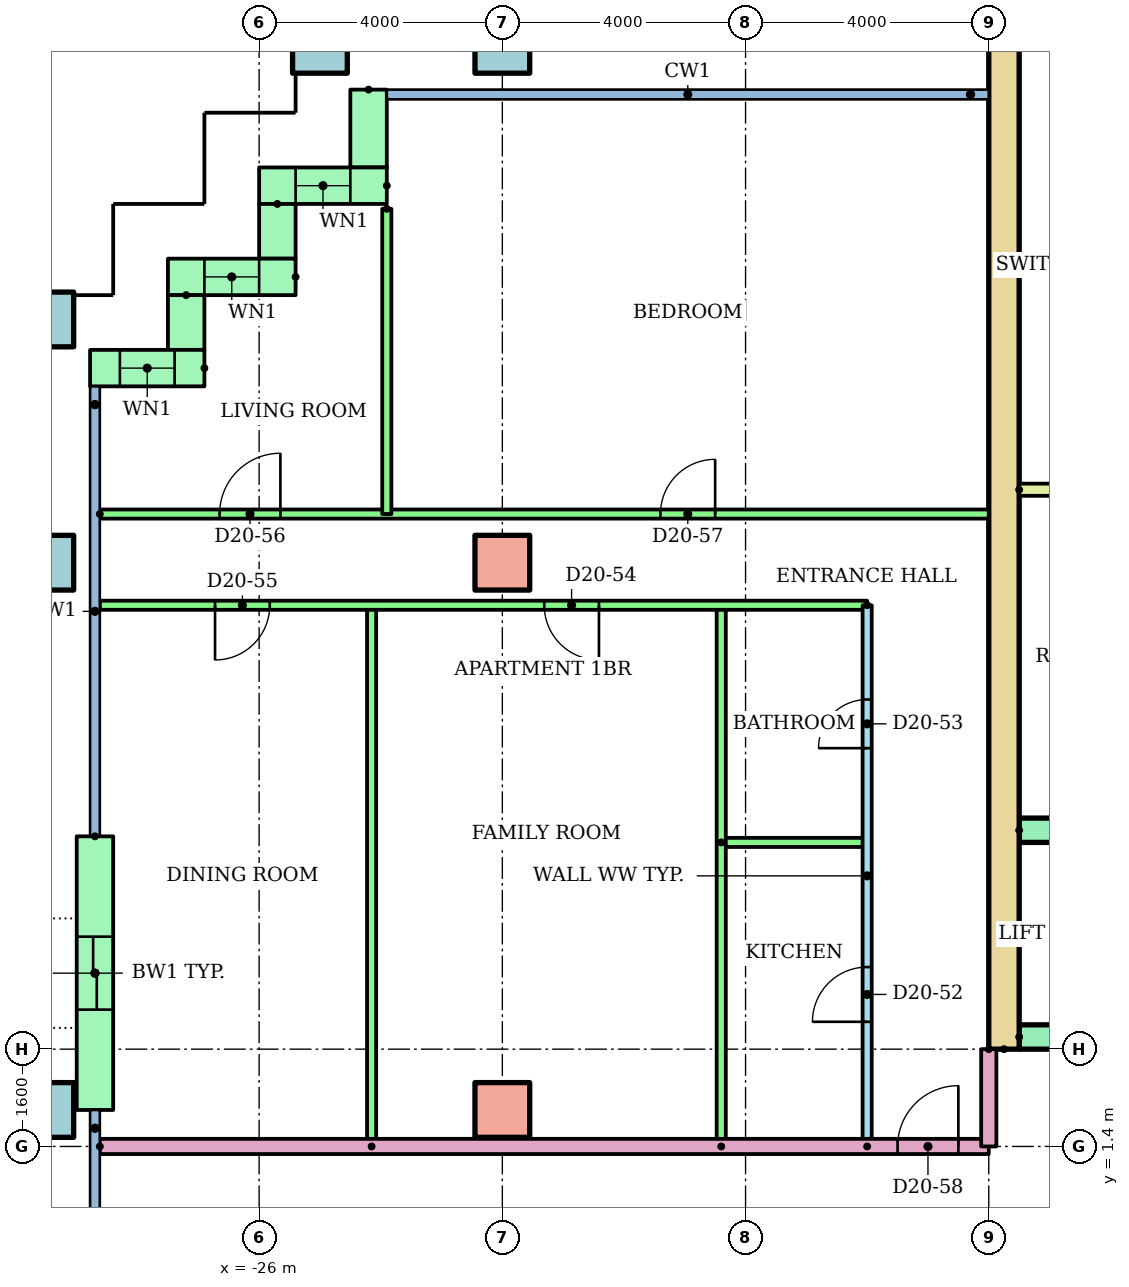
"""IFC4 building model, lengths in metres.
Left out: names, types, materials, properties, quantities, classifications, styles, units other than length and angle.
Written with IfcOpenShell. Run it as: python <this file> out.ifc"""

import sys

from ifc_helpers import new_model, si_unit, direction, frame, frame_2d, origin, origin_2d, place, context, subcontext, project, spatial, rectangle, hollow_rectangle, extrude, element, fill, save


model = new_model("IFC4")
c1 = context("Model", 3, precision=1e-05, world=origin(), true_north=direction((0.0, 1.0)))
c2 = subcontext(c1, "Body", "Model", "MODEL_VIEW")
j1 = project(units=[si_unit("LENGTHUNIT", "METRE"), si_unit("PLANEANGLEUNIT", "RADIAN")], contexts=[c1])
p1 = place(None, origin())
s1 = spatial("IfcSite", under=j1, at=p1, CompositionType="ELEMENT")
p2 = place(p1, origin())
s2 = spatial("IfcBuilding", under=s1, at=p2, CompositionType="ELEMENT")
p3 = place(p2, frame((0.0, 0.0, 80.7)))
s3 = spatial("IfcBuildingStorey", under=s2, at=p3, CompositionType="ELEMENT", Elevation=80.7)
p4 = place(p3, frame((-29.5, 2.0, 0.0)))
e1 = element("IfcColumn", 1, at=p4, inside=s3, PredefinedType="COLUMN", context=c2, shape_type="SweptSolid", body=[
    extrude(hollow_rectangle(XDim=0.9, YDim=0.9, WallThickness=0.045, at=origin_2d()), origin(), (0.0, 0.0, 1.0), 3.2),
])
p5 = place(p3, frame((-22.0, 2.0, 0.0)))
e2 = element("IfcColumn", 2, at=p5, inside=s3, PredefinedType="COLUMN", context=c2, shape_type="SweptSolid", body=[
    extrude(rectangle(XDim=0.9, YDim=0.9, at=origin_2d()), origin(), (0.0, 0.0, 1.0), 3.2),
])
p6 = place(p3, frame((-29.5, 11.0, 0.0)))
e3 = element("IfcColumn", 3, at=p6, inside=s3, PredefinedType="COLUMN", context=c2, shape_type="SweptSolid", body=[
    extrude(hollow_rectangle(XDim=0.9, YDim=0.9, WallThickness=0.045, at=origin_2d()), origin(), (0.0, 0.0, 1.0), 3.2),
])
p7 = place(p3, frame((-22.0, 11.0, 0.0)))
e4 = element("IfcColumn", 4, at=p7, inside=s3, PredefinedType="COLUMN", context=c2, shape_type="SweptSolid", body=[
    extrude(rectangle(XDim=0.9, YDim=0.9, at=origin_2d()), origin(), (0.0, 0.0, 1.0), 3.2),
])
for number, where in (
    (5, (-29.5, 15.0, 0.0)),
    (6, (-25.0, 19.5, 0.0)),
    (7, (-22.0, 19.5, 0.0)),
):
    element("IfcColumn", number, at=place(p3, frame(where)), inside=s3, PredefinedType="COLUMN", context=c2, shape_type="SweptSolid", body=[
        extrude(hollow_rectangle(XDim=0.9, YDim=0.9, WallThickness=0.045, at=origin_2d()), origin(), (0.0, 0.0, 1.0), 3.2),
    ])
p8 = place(p3, frame((-24.2, 18.78, 0.0), z_axis=(0.0, 0.0, 1.0), x_axis=(0.0, -1.0, 0.0)))
e8 = element("IfcWall", 8, at=p8, inside=s3, PredefinedType="STANDARD", context=c2, shape_type="SweptSolid", body=[
    extrude(rectangle(XDim=1.28, YDim=0.6, at=frame_2d((0.64, 0.0))), origin(), (0.0, 0.0, 1.0), 2.92),
])
p9 = place(p3, frame((-23.9, 17.2, 0.0), z_axis=(0.0, 0.0, 1.0), x_axis=(-1.0, 0.0, 0.0)))
e9 = element("IfcWall", 9, at=p9, inside=s3, PredefinedType="STANDARD", context=c2, shape_type="SweptSolid", body=[
    extrude(rectangle(XDim=2.1, YDim=0.6, at=frame_2d((1.05, 0.0))), origin(), (0.0, 0.0, 1.0), 2.92),
])
p10 = place(p9, frame((0.6, 0.0, 0.9)))
e10 = element("IfcOpeningElement", 10, at=p10, cuts=e9, PredefinedType="OPENING", context=c2, shape_type="SweptSolid", body=[
    extrude(rectangle(XDim=0.9, YDim=1.5, at=frame_2d((0.45, 0.75))), frame((0.0, 0.31, 0.0), z_axis=(0.0, -1.0, 0.0), x_axis=(1.0, 0.0, 0.0)), (0.0, 0.0, 1.0), 0.62),
])
p11 = place(p3, frame((-25.7, 16.9, 0.0), z_axis=(0.0, 0.0, 1.0), x_axis=(0.0, -1.0, 0.0)))
e11 = element("IfcWall", 11, at=p11, inside=s3, PredefinedType="STANDARD", context=c2, shape_type="SweptSolid", body=[
    extrude(rectangle(XDim=0.9, YDim=0.6, at=frame_2d((0.45, 0.0))), origin(), (0.0, 0.0, 1.0), 2.92),
])
p12 = place(p3, frame((-25.4, 15.7, 0.0), z_axis=(0.0, 0.0, 1.0), x_axis=(-1.0, 0.0, 0.0)))
e12 = element("IfcWall", 12, at=p12, inside=s3, PredefinedType="STANDARD", context=c2, shape_type="SweptSolid", body=[
    extrude(rectangle(XDim=2.1, YDim=0.6, at=frame_2d((1.05, 0.0))), origin(), (0.0, 0.0, 1.0), 2.92),
])
p13 = place(p12, frame((0.6, 0.0, 0.9)))
e13 = element("IfcOpeningElement", 13, at=p13, cuts=e12, PredefinedType="OPENING", context=c2, shape_type="SweptSolid", body=[
    extrude(rectangle(XDim=0.9, YDim=1.5, at=frame_2d((0.45, 0.75))), frame((0.0, 0.31, 0.0), z_axis=(0.0, -1.0, 0.0), x_axis=(1.0, 0.0, 0.0)), (0.0, 0.0, 1.0), 0.62),
])
p14 = place(p3, frame((-27.2, 15.4, 0.0), z_axis=(0.0, 0.0, 1.0), x_axis=(0.0, -1.0, 0.0)))
e14 = element("IfcWall", 14, at=p14, inside=s3, PredefinedType="STANDARD", context=c2, shape_type="SweptSolid", body=[
    extrude(rectangle(XDim=0.9, YDim=0.6, at=frame_2d((0.45, 0.0))), origin(), (0.0, 0.0, 1.0), 2.92),
])
p15 = place(p3, frame((-26.9, 14.2, 0.0), z_axis=(0.0, 0.0, 1.0), x_axis=(-1.0, 0.0, 0.0)))
e15 = element("IfcWall", 15, at=p15, inside=s3, PredefinedType="STANDARD", context=c2, shape_type="SweptSolid", body=[
    extrude(rectangle(XDim=1.88, YDim=0.6, at=frame_2d((0.94, 0.0))), origin(), (0.0, 0.0, 1.0), 2.92),
])
p16 = place(p15, frame((0.49, 0.0, 0.9)))
e16 = element("IfcOpeningElement", 16, at=p16, cuts=e15, PredefinedType="OPENING", context=c2, shape_type="SweptSolid", body=[
    extrude(rectangle(XDim=0.9, YDim=1.5, at=frame_2d((0.45, 0.75))), frame((0.0, 0.31, 0.0), z_axis=(0.0, -1.0, 0.0), x_axis=(1.0, 0.0, 0.0)), (0.0, 0.0, 1.0), 0.62),
])
p17 = place(p3, frame((-28.7, 6.5, 0.0), z_axis=(0.0, 0.0, 1.0), x_axis=(0.0, -1.0, 0.0)))
e17 = element("IfcWall", 17, at=p17, inside=s3, PredefinedType="STANDARD", context=c2, shape_type="SweptSolid", body=[
    extrude(rectangle(XDim=4.5, YDim=0.6, at=frame_2d((2.25, 0.0))), origin(), (0.0, 0.0, 1.0), 2.92),
])
p18 = place(p17, frame((1.65, 0.0, 0.0)))
e18 = element("IfcOpeningElement", 18, at=p18, cuts=e17, PredefinedType="OPENING", context=c2, shape_type="SweptSolid", body=[
    extrude(rectangle(XDim=1.2, YDim=2.1, at=frame_2d((0.6, 1.05))), frame((0.0, 0.31, 0.0), z_axis=(0.0, -1.0, 0.0), x_axis=(1.0, 0.0, 0.0)), (0.0, 0.0, 1.0), 0.62),
])
p19 = place(p3, frame((-13.75, 3.0, 0.0), z_axis=(0.0, 0.0, 1.0), x_axis=(0.0, 1.0, 0.0)))
e19 = element("IfcWall", 19, at=p19, inside=s3, PredefinedType="SHEAR", context=c2, shape_type="SweptSolid", body=[
    extrude(rectangle(XDim=17.0, YDim=0.5, at=frame_2d((8.5, 0.0))), origin(), (0.0, 0.0, 1.0), 2.92),
])
p20 = place(p3, frame((-13.5, 3.2, 0.0)))
e20 = element("IfcWall", 20, at=p20, inside=s3, PredefinedType="SHEAR", context=c2, shape_type="SweptSolid", body=[
    extrude(rectangle(XDim=27.0, YDim=0.4, at=frame_2d((13.5, 0.0))), origin(), (0.0, 0.0, 1.0), 2.92),
])
p21 = place(p20, frame((6.861, 0.0, 0.0)))
e21 = element("IfcOpeningElement", 21, at=p21, cuts=e20, PredefinedType="OPENING", context=c2, shape_type="SweptSolid", body=[
    extrude(rectangle(XDim=1.1, YDim=2.1, at=frame_2d((0.55, 1.05))), frame((0.0, 0.21, 0.0), z_axis=(0.0, -1.0, 0.0), x_axis=(1.0, 0.0, 0.0)), (0.0, 0.0, 1.0), 0.42),
])
p22 = place(p20, frame((9.906, 0.0, 0.0)))
e22 = element("IfcOpeningElement", 22, at=p22, cuts=e20, PredefinedType="OPENING", context=c2, shape_type="SweptSolid", body=[
    extrude(rectangle(XDim=1.1, YDim=2.1, at=frame_2d((0.55, 1.05))), frame((0.0, 0.21, 0.0), z_axis=(0.0, -1.0, 0.0), x_axis=(1.0, 0.0, 0.0)), (0.0, 0.0, 1.0), 0.42),
])
p23 = place(p20, frame((15.994, 0.0, 0.0)))
e23 = element("IfcOpeningElement", 23, at=p23, cuts=e20, PredefinedType="OPENING", context=c2, shape_type="SweptSolid", body=[
    extrude(rectangle(XDim=1.1, YDim=2.1, at=frame_2d((0.55, 1.05))), frame((0.0, 0.21, 0.0), z_axis=(0.0, -1.0, 0.0), x_axis=(1.0, 0.0, 0.0)), (0.0, 0.0, 1.0), 0.42),
])
p24 = place(p20, frame((19.039, 0.0, 0.0)))
e24 = element("IfcOpeningElement", 24, at=p24, cuts=e20, PredefinedType="OPENING", context=c2, shape_type="SweptSolid", body=[
    extrude(rectangle(XDim=1.1, YDim=2.1, at=frame_2d((0.55, 1.05))), frame((0.0, 0.21, 0.0), z_axis=(0.0, -1.0, 0.0), x_axis=(1.0, 0.0, 0.0)), (0.0, 0.0, 1.0), 0.42),
])
p25 = place(p20, frame((12.6, 0.0, 0.0)))
e25 = element("IfcOpeningElement", 25, at=p25, cuts=e20, PredefinedType="OPENING", context=c2, shape_type="SweptSolid", body=[
    extrude(rectangle(XDim=1.8, YDim=2.1, at=frame_2d((0.9, 1.05))), frame((0.0, 0.21, 0.0), z_axis=(0.0, -1.0, 0.0), x_axis=(1.0, 0.0, 0.0)), (0.0, 0.0, 1.0), 0.42),
])
p26 = place(p3, frame((-13.5, 6.6, 0.0)))
e26 = element("IfcWall", 26, at=p26, inside=s3, PredefinedType="SHEAR", context=c2, shape_type="SweptSolid", body=[
    extrude(rectangle(XDim=11.978, YDim=0.4, at=frame_2d((5.989, 0.0))), origin(), (0.0, 0.0, 1.0), 2.92),
])
p27 = place(p3, frame((-13.5, 12.2, 0.0)))
e27 = element("IfcWall", 27, at=p27, inside=s3, PredefinedType="PARTITIONING", context=c2, shape_type="SweptSolid", body=[
    extrude(rectangle(XDim=3.9, YDim=0.2, at=frame_2d((1.95, 0.0))), origin(), (0.0, 0.0, 1.0), 2.92),
])
p28 = place(p3, frame((-16.0, 1.4, 0.0), z_axis=(0.0, 0.0, 1.0), x_axis=(0.0, 1.0, 0.0)))
e28 = element("IfcWall", 28, at=p28, inside=s3, PredefinedType="PARTITIONING", context=c2, shape_type="SweptSolid", body=[
    extrude(rectangle(XDim=8.9, YDim=0.15, at=frame_2d((4.45, 0.0))), origin(), (0.0, 0.0, 1.0), 2.4),
])
p29 = place(p28, frame((2.05, 0.0, 0.0)))
e29 = element("IfcOpeningElement", 29, at=p29, cuts=e28, PredefinedType="OPENING", context=c2, shape_type="SweptSolid", body=[
    extrude(rectangle(XDim=0.9, YDim=2.1, at=frame_2d((0.45, 1.05))), frame((0.0, 0.085, 0.0), z_axis=(0.0, -1.0, 0.0), x_axis=(1.0, 0.0, 0.0)), (0.0, 0.0, 1.0), 0.17),
])
p30 = place(p28, frame((6.55, 0.0, 0.0)))
e30 = element("IfcOpeningElement", 30, at=p30, cuts=e28, PredefinedType="OPENING", context=c2, shape_type="SweptSolid", body=[
    extrude(rectangle(XDim=0.8, YDim=2.1, at=frame_2d((0.4, 1.05))), frame((0.0, 0.085, 0.0), z_axis=(0.0, -1.0, 0.0), x_axis=(1.0, 0.0, 0.0)), (0.0, 0.0, 1.0), 0.17),
])
p31 = place(p3, frame((-18.4, 6.4, 0.0)))
e31 = element("IfcWall", 31, at=p31, inside=s3, PredefinedType="PARTITIONING", context=c2, shape_type="SweptSolid", body=[
    extrude(rectangle(XDim=2.4, YDim=0.15, at=frame_2d((1.2, 0.0))), origin(), (0.0, 0.0, 1.0), 2.4),
])
for number, where, z_axis, x_axis in (
    (32, (-18.4, 1.4, 0.0), (0.0, 0.0, 1.0), (0.0, 1.0, 0.0)),
    (33, (-24.15, 1.4, 0.0), (0.0, 0.0, 1.0), (0.0, 1.0, 0.0)),
):
    element("IfcWall", number, at=place(p3, frame(where, z_axis=z_axis, x_axis=x_axis)), inside=s3, PredefinedType="PARTITIONING", context=c2, shape_type="SweptSolid", body=[
        extrude(rectangle(XDim=8.9, YDim=0.15, at=frame_2d((4.45, 0.0))), origin(), (0.0, 0.0, 1.0), 2.4),
    ])
p32 = place(p3, frame((-16.0, 10.3, 0.0), z_axis=(0.0, 0.0, 1.0), x_axis=(-1.0, 0.0, 0.0)))
e34 = element("IfcWall", 34, at=p32, inside=s3, PredefinedType="PARTITIONING", context=c2, shape_type="SweptSolid", body=[
    extrude(rectangle(XDim=12.62, YDim=0.15, at=frame_2d((6.31, 0.0))), origin(), (0.0, 0.0, 1.0), 2.4),
])
p33 = place(p32, frame((4.411, 0.0, 0.0)))
e35 = element("IfcOpeningElement", 35, at=p33, cuts=e34, PredefinedType="OPENING", context=c2, shape_type="SweptSolid", body=[
    extrude(rectangle(XDim=0.9, YDim=2.1, at=frame_2d((0.45, 1.05))), frame((0.0, 0.085, 0.0), z_axis=(0.0, -1.0, 0.0), x_axis=(1.0, 0.0, 0.0)), (0.0, 0.0, 1.0), 0.17),
])
p34 = place(p32, frame((9.825, 0.0, 0.0)))
e36 = element("IfcOpeningElement", 36, at=p34, cuts=e34, PredefinedType="OPENING", context=c2, shape_type="SweptSolid", body=[
    extrude(rectangle(XDim=0.9, YDim=2.1, at=frame_2d((0.45, 1.05))), frame((0.0, 0.085, 0.0), z_axis=(0.0, -1.0, 0.0), x_axis=(1.0, 0.0, 0.0)), (0.0, 0.0, 1.0), 0.17),
])
p35 = place(p3, frame((-28.62, 11.8, 0.0)))
e37 = element("IfcWall", 37, at=p35, inside=s3, PredefinedType="PARTITIONING", context=c2, shape_type="SweptSolid", body=[
    extrude(rectangle(XDim=14.62, YDim=0.15, at=frame_2d((7.31, 0.0))), origin(), (0.0, 0.0, 1.0), 2.4),
])
p36 = place(p35, frame((1.97, 0.0, 0.0)))
e38 = element("IfcOpeningElement", 38, at=p36, cuts=e37, PredefinedType="OPENING", context=c2, shape_type="SweptSolid", body=[
    extrude(rectangle(XDim=1.0, YDim=2.1, at=frame_2d((0.5, 1.05))), frame((0.0, 0.085, 0.0), z_axis=(0.0, -1.0, 0.0), x_axis=(1.0, 0.0, 0.0)), (0.0, 0.0, 1.0), 0.17),
])
p37 = place(p35, frame((9.22, 0.0, 0.0)))
e39 = element("IfcOpeningElement", 39, at=p37, cuts=e37, PredefinedType="OPENING", context=c2, shape_type="SweptSolid", body=[
    extrude(rectangle(XDim=0.9, YDim=2.1, at=frame_2d((0.45, 1.05))), frame((0.0, 0.085, 0.0), z_axis=(0.0, -1.0, 0.0), x_axis=(1.0, 0.0, 0.0)), (0.0, 0.0, 1.0), 0.17),
])
p38 = place(p3, frame((-23.9, 16.82, 0.0), z_axis=(0.0, 0.0, 1.0), x_axis=(0.0, -1.0, 0.0)))
e40 = element("IfcWall", 40, at=p38, inside=s3, PredefinedType="PARTITIONING", context=c2, shape_type="SweptSolid", body=[
    extrude(rectangle(XDim=5.02, YDim=0.15, at=frame_2d((2.51, 0.0))), origin(), (0.0, 0.0, 1.0), 2.4),
])
p39 = place(p3, frame((-28.62, 1.4, 0.0)))
e41 = element("IfcWall", 41, at=p39, inside=s3, PredefinedType="PARTITIONING", context=c2, shape_type="SweptSolid", body=[
    extrude(rectangle(XDim=14.62, YDim=0.25, at=frame_2d((7.31, 0.0))), origin(), (0.0, 0.0, 1.0), 2.4),
])
p40 = place(p39, frame((13.12, 0.0, 0.0)))
e42 = element("IfcOpeningElement", 42, at=p40, cuts=e41, PredefinedType="OPENING", context=c2, shape_type="SweptSolid", body=[
    extrude(rectangle(XDim=1.0, YDim=2.1, at=frame_2d((0.5, 1.05))), frame((0.0, 0.135, 0.0), z_axis=(0.0, -1.0, 0.0), x_axis=(1.0, 0.0, 0.0)), (0.0, 0.0, 1.0), 0.27),
])
p41 = place(p3, frame((-14.0, 3.0, 0.0), z_axis=(0.0, 0.0, 1.0), x_axis=(0.0, -1.0, 0.0)))
e43 = element("IfcWall", 43, at=p41, inside=s3, PredefinedType="PARTITIONING", context=c2, shape_type="SweptSolid", body=[
    extrude(rectangle(XDim=1.6, YDim=0.25, at=frame_2d((0.8, 0.0))), origin(), (0.0, 0.0, 1.0), 2.4),
])
p42 = place(p10, origin())
e44 = element("IfcWindow", 44, at=p42, inside=s3, PartitioningType="SINGLE_PANEL", PredefinedType="WINDOW", context=c2, shape_type="SweptSolid", body=[
    extrude(rectangle(XDim=0.9, YDim=1.5, at=frame_2d((0.45, 0.75))), frame((0.0, 0.03, 0.0), z_axis=(0.0, -1.0, 0.0), x_axis=(1.0, 0.0, 0.0)), (0.0, 0.0, 1.0), 0.06),
])
fill(e10, e44)
p43 = place(p13, origin())
e45 = element("IfcWindow", 45, at=p43, inside=s3, PartitioningType="SINGLE_PANEL", PredefinedType="WINDOW", context=c2, shape_type="SweptSolid", body=[
    extrude(rectangle(XDim=0.9, YDim=1.5, at=frame_2d((0.45, 0.75))), frame((0.0, 0.03, 0.0), z_axis=(0.0, -1.0, 0.0), x_axis=(1.0, 0.0, 0.0)), (0.0, 0.0, 1.0), 0.06),
])
fill(e13, e45)
p44 = place(p16, origin())
e46 = element("IfcWindow", 46, at=p44, inside=s3, PartitioningType="SINGLE_PANEL", PredefinedType="WINDOW", context=c2, shape_type="SweptSolid", body=[
    extrude(rectangle(XDim=0.9, YDim=1.5, at=frame_2d((0.45, 0.75))), frame((0.0, 0.03, 0.0), z_axis=(0.0, -1.0, 0.0), x_axis=(1.0, 0.0, 0.0)), (0.0, 0.0, 1.0), 0.06),
])
fill(e16, e46)
p45 = place(p29, origin())
e47 = element("IfcDoor", 47, at=p45, inside=s3, OperationType="SINGLE_SWING_LEFT", PredefinedType="DOOR", context=c2, shape_type="SweptSolid", body=[
    extrude(rectangle(XDim=0.9, YDim=2.1, at=frame_2d((0.45, 1.05))), frame((0.0, 0.025, 0.0), z_axis=(0.0, -1.0, 0.0), x_axis=(1.0, 0.0, 0.0)), (0.0, 0.0, 1.0), 0.05),
])
fill(e29, e47)
p46 = place(p30, origin())
e48 = element("IfcDoor", 48, at=p46, inside=s3, OperationType="SINGLE_SWING_LEFT", PredefinedType="DOOR", context=c2, shape_type="SweptSolid", body=[
    extrude(rectangle(XDim=0.8, YDim=2.1, at=frame_2d((0.4, 1.05))), frame((0.0, 0.025, 0.0), z_axis=(0.0, -1.0, 0.0), x_axis=(1.0, 0.0, 0.0)), (0.0, 0.0, 1.0), 0.05),
])
fill(e30, e48)
p47 = place(p33, origin())
e49 = element("IfcDoor", 49, at=p47, inside=s3, OperationType="SINGLE_SWING_LEFT", PredefinedType="DOOR", context=c2, shape_type="SweptSolid", body=[
    extrude(rectangle(XDim=0.9, YDim=2.1, at=frame_2d((0.45, 1.05))), frame((0.0, 0.025, 0.0), z_axis=(0.0, -1.0, 0.0), x_axis=(1.0, 0.0, 0.0)), (0.0, 0.0, 1.0), 0.05),
])
fill(e35, e49)
p48 = place(p34, origin())
e50 = element("IfcDoor", 50, at=p48, inside=s3, OperationType="SINGLE_SWING_RIGHT", PredefinedType="DOOR", context=c2, shape_type="SweptSolid", body=[
    extrude(rectangle(XDim=0.9, YDim=2.1, at=frame_2d((0.45, 1.05))), frame((0.0, 0.025, 0.0), z_axis=(0.0, -1.0, 0.0), x_axis=(1.0, 0.0, 0.0)), (0.0, 0.0, 1.0), 0.05),
])
fill(e36, e50)
p49 = place(p36, origin())
e51 = element("IfcDoor", 51, at=p49, inside=s3, OperationType="SINGLE_SWING_RIGHT", PredefinedType="DOOR", context=c2, shape_type="SweptSolid", body=[
    extrude(rectangle(XDim=1.0, YDim=2.1, at=frame_2d((0.5, 1.05))), frame((0.0, 0.025, 0.0), z_axis=(0.0, -1.0, 0.0), x_axis=(1.0, 0.0, 0.0)), (0.0, 0.0, 1.0), 0.05),
])
fill(e38, e51)
p50 = place(p37, origin())
e52 = element("IfcDoor", 52, at=p50, inside=s3, OperationType="SINGLE_SWING_RIGHT", PredefinedType="DOOR", context=c2, shape_type="SweptSolid", body=[
    extrude(rectangle(XDim=0.9, YDim=2.1, at=frame_2d((0.45, 1.05))), frame((0.0, 0.025, 0.0), z_axis=(0.0, -1.0, 0.0), x_axis=(1.0, 0.0, 0.0)), (0.0, 0.0, 1.0), 0.05),
])
fill(e39, e52)
p51 = place(p40, origin())
e53 = element("IfcDoor", 53, at=p51, inside=s3, OperationType="SINGLE_SWING_RIGHT", PredefinedType="DOOR", context=c2, shape_type="SweptSolid", body=[
    extrude(rectangle(XDim=1.0, YDim=2.1, at=frame_2d((0.5, 1.05))), frame((0.0, 0.025, 0.0), z_axis=(0.0, -1.0, 0.0), x_axis=(1.0, 0.0, 0.0)), (0.0, 0.0, 1.0), 0.05),
])
fill(e42, e53)
p52 = place(p18, origin())
e54 = element("IfcDoor", 54, at=p52, inside=s3, OperationType="SLIDING_TO_LEFT", PredefinedType="DOOR", context=c2, shape_type="SweptSolid", body=[
    extrude(rectangle(XDim=1.2, YDim=2.1, at=frame_2d((0.6, 1.05))), frame((0.0, 0.025, 0.0), z_axis=(0.0, -1.0, 0.0), x_axis=(1.0, 0.0, 0.0)), (0.0, 0.0, 1.0), 0.05),
])
fill(e18, e54)
save(model, sys.argv[1])
